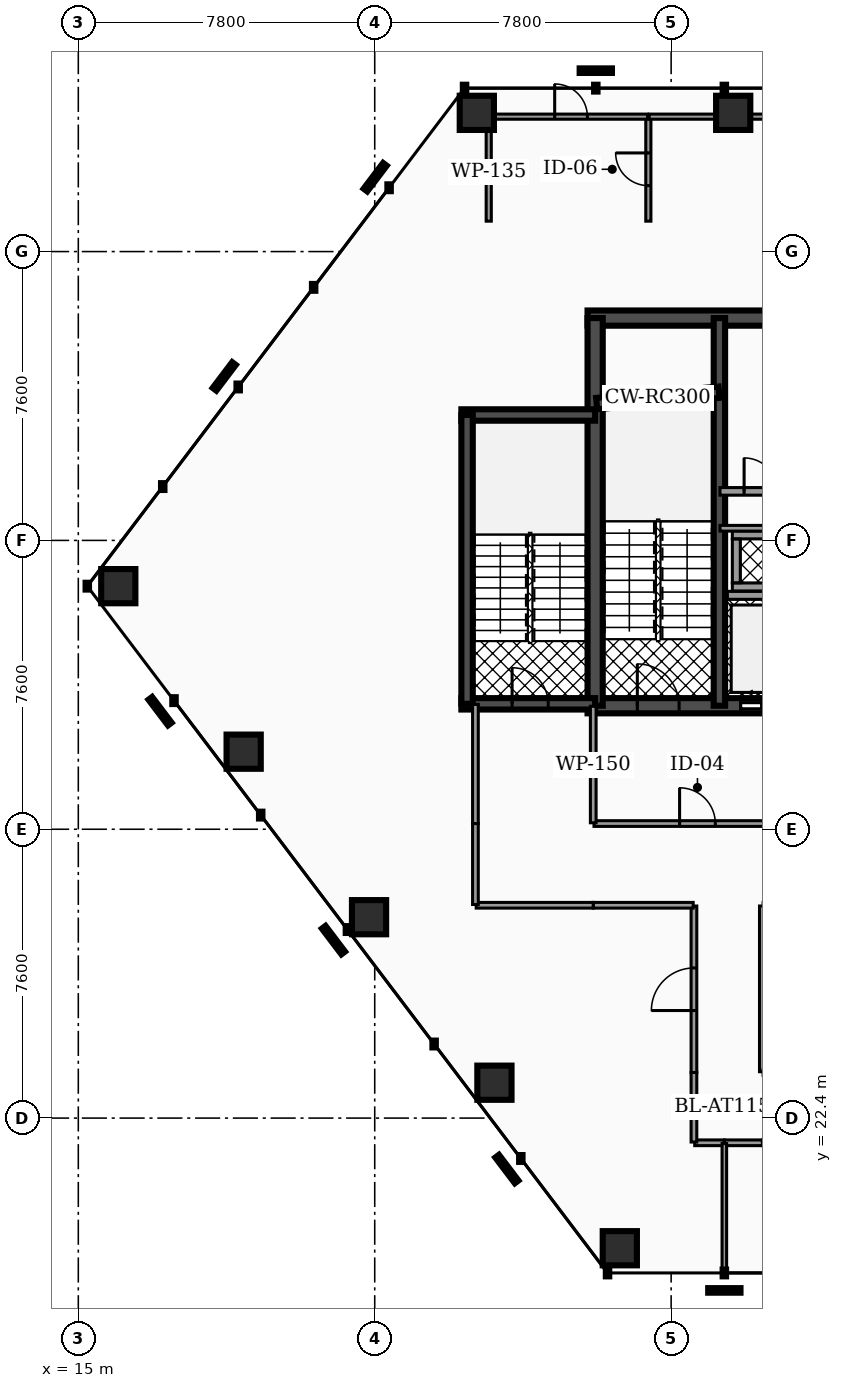
"""IFC4 building model, lengths in metres.
Left out: names, types, materials, properties, quantities, classifications, styles, units other than length and angle.
Written with IfcOpenShell. Run it as: python <this file> out.ifc"""

import sys

from ifc_helpers import new_model, si_unit, direction, frame, frame_2d, origin, origin_2d, place, context, subcontext, project, spatial, rectangle, hollow_rectangle, extrude, element, fill, save


model = new_model("IFC4")
c1 = context("Model", 3, precision=1e-05, world=origin(), true_north=direction((0.0, 1.0)))
c2 = subcontext(c1, "Body", "Model", "MODEL_VIEW")
j1 = project(units=[si_unit("LENGTHUNIT", "METRE"), si_unit("PLANEANGLEUNIT", "RADIAN")], contexts=[c1])
p1 = place(None, origin())
s1 = spatial("IfcSite", under=j1, at=p1, CompositionType="ELEMENT")
p2 = place(p1, origin())
s2 = spatial("IfcBuilding", under=s1, at=p2, CompositionType="ELEMENT")
p3 = place(p2, frame((0.0, 0.0, 105.06)))
s3 = spatial("IfcBuildingStorey", under=s2, at=p3, CompositionType="ELEMENT", Elevation=105.06)
p4 = place(p3, frame((28.4, 43.45, 0.0), z_axis=(0.0, 0.0, 1.0), x_axis=(1.0, 0.0, 0.0)))
e1 = element("IfcWall", 1, at=p4, inside=s3, PredefinedType="SHEAR", context=c2, shape_type="SweptSolid", body=[
    extrude(rectangle(XDim=20.06, YDim=0.4, at=frame_2d((10.03, 0.0))), origin(), (0.0, 0.0, 1.0), 3.73),
])
p5 = place(p3, frame((28.4, 33.25, 0.0), z_axis=(0.0, 0.0, 1.0), x_axis=(1.0, 0.0, 0.0)))
e2 = element("IfcWall", 2, at=p5, inside=s3, PredefinedType="SHEAR", context=c2, shape_type="SweptSolid", body=[
    extrude(rectangle(XDim=20.06, YDim=0.4, at=frame_2d((10.03, 0.0))), origin(), (0.0, 0.0, 1.0), 3.73),
])
p6 = place(p5, frame((4.03, 0.0, 0.0)))
e3 = element("IfcOpeningElement", 3, at=p6, cuts=e2, PredefinedType="OPENING", context=c2, shape_type="SweptSolid", body=[
    extrude(rectangle(XDim=1.1, YDim=2.15, at=frame_2d((0.55, 1.075))), frame((0.0, 0.21, 0.0), z_axis=(0.0, -1.0, 0.0), x_axis=(1.0, 0.0, 0.0)), (0.0, 0.0, 1.0), 0.42),
])
p7 = place(p5, frame((14.87, 0.0, 0.0)))
e4 = element("IfcOpeningElement", 4, at=p7, cuts=e2, PredefinedType="OPENING", context=c2, shape_type="SweptSolid", body=[
    extrude(rectangle(XDim=1.1, YDim=2.15, at=frame_2d((0.55, 1.075))), frame((0.0, 0.21, 0.0), z_axis=(0.0, -1.0, 0.0), x_axis=(1.0, 0.0, 0.0)), (0.0, 0.0, 1.0), 0.42),
])
p8 = place(p5, frame((1.31, 0.0, 0.0)))
e5 = element("IfcOpeningElement", 5, at=p8, cuts=e2, PredefinedType="OPENING", context=c2, shape_type="SweptSolid", body=[
    extrude(rectangle(XDim=1.1, YDim=2.2, at=frame_2d((0.55, 1.1))), frame((0.0, 0.21, 0.0), z_axis=(0.0, -1.0, 0.0), x_axis=(1.0, 0.0, 0.0)), (0.0, 0.0, 1.0), 0.42),
])
p9 = place(p5, frame((9.44, 0.0, 0.0)))
e6 = element("IfcOpeningElement", 6, at=p9, cuts=e2, PredefinedType="OPENING", context=c2, shape_type="SweptSolid", body=[
    extrude(rectangle(XDim=1.12, YDim=2.05, at=frame_2d((0.56, 1.025))), frame((0.0, 0.21, 0.0), z_axis=(0.0, -1.0, 0.0), x_axis=(1.0, 0.0, 0.0)), (0.0, 0.0, 1.0), 0.42),
])
p10 = place(p5, frame((17.65, 0.0, 0.0)))
e7 = element("IfcOpeningElement", 7, at=p10, cuts=e2, PredefinedType="OPENING", context=c2, shape_type="SweptSolid", body=[
    extrude(rectangle(XDim=1.1, YDim=2.2, at=frame_2d((0.55, 1.1))), frame((0.0, 0.21, 0.0), z_axis=(0.0, -1.0, 0.0), x_axis=(1.0, 0.0, 0.0)), (0.0, 0.0, 1.0), 0.42),
])
p11 = place(p3, frame((28.6, 33.25, 0.0), z_axis=(0.0, 0.0, 1.0), x_axis=(0.0, 1.0, 0.0)))
e8 = element("IfcWall", 8, at=p11, inside=s3, PredefinedType="SHEAR", context=c2, shape_type="SweptSolid", body=[
    extrude(rectangle(XDim=10.2, YDim=0.4, at=frame_2d((5.1, 0.0))), origin(), (0.0, 0.0, 1.0), 3.73),
])
p12 = place(p3, frame((31.87, 33.25, 0.0), z_axis=(0.0, 0.0, 1.0), x_axis=(0.0, 1.0, 0.0)))
e9 = element("IfcWall", 9, at=p12, inside=s3, PredefinedType="SHEAR", context=c2, shape_type="SweptSolid", body=[
    extrude(rectangle(XDim=10.2, YDim=0.3, at=frame_2d((5.1, 0.0))), origin(), (0.0, 0.0, 1.0), 3.73),
])
p13 = place(p3, frame((28.64, 41.2, 0.0), z_axis=(0.0, 0.0, 1.0), x_axis=(0.995687118776, 0.092774789157, 0.0)))
e10 = element("IfcWall", 10, at=p13, inside=s3, PredefinedType="SHEAR", context=c2, shape_type="SweptSolid", body=[
    extrude(rectangle(XDim=3.234, YDim=0.3, at=frame_2d((1.617, 0.0))), origin(), (0.0, 0.0, 1.0), 3.73),
])
p14 = place(p3, frame((25.08, 40.9, 0.0), z_axis=(0.0, 0.0, 1.0), x_axis=(1.0, 0.0, 0.0)))
e11 = element("IfcWall", 11, at=p14, inside=s3, PredefinedType="SHEAR", context=c2, shape_type="SweptSolid", body=[
    extrude(rectangle(XDim=3.52, YDim=0.3, at=frame_2d((1.76, 0.0))), origin(), (0.0, 0.0, 1.0), 3.73),
])
p15 = place(p3, frame((25.08, 33.3, 0.0), z_axis=(0.0, 0.0, 1.0), x_axis=(1.0, 0.0, 0.0)))
e12 = element("IfcWall", 12, at=p15, inside=s3, PredefinedType="SHEAR", context=c2, shape_type="SweptSolid", body=[
    extrude(rectangle(XDim=3.52, YDim=0.3, at=frame_2d((1.76, 0.0))), origin(), (0.0, 0.0, 1.0), 3.73),
])
p16 = place(p15, frame((1.335, 0.0, 0.0)))
e13 = element("IfcOpeningElement", 13, at=p16, cuts=e12, PredefinedType="OPENING", context=c2, shape_type="SweptSolid", body=[
    extrude(rectangle(XDim=0.95, YDim=2.2, at=frame_2d((0.475, 1.1))), frame((0.0, 0.16, 0.0), z_axis=(0.0, -1.0, 0.0), x_axis=(1.0, 0.0, 0.0)), (0.0, 0.0, 1.0), 0.32),
])
p17 = place(p3, frame((25.23, 33.3, 0.0), z_axis=(0.0, 0.0, 1.0), x_axis=(0.0, 1.0, 0.0)))
e14 = element("IfcWall", 14, at=p17, inside=s3, PredefinedType="SHEAR", context=c2, shape_type="SweptSolid", body=[
    extrude(rectangle(XDim=7.6, YDim=0.3, at=frame_2d((3.8, 0.0))), origin(), (0.0, 0.0, 1.0), 3.73),
])
p18 = place(p3, frame((32.233, 48.85, 0.0), z_axis=(-0.073076267852, -0.031187907173, 0.996838589503), x_axis=(0.392531312989, -0.919738641312, 0.0)))
e15 = element("IfcColumn", 15, at=p18, inside=s3, PredefinedType="COLUMN", context=c2, shape_type="SweptSolid", body=[
    extrude(hollow_rectangle(XDim=0.9, YDim=0.9, WallThickness=0.045, at=origin_2d()), origin(), (0.0, 0.0, 1.0), 3.742),
])
p19 = place(p3, frame((25.487, 48.85, 0.0), z_axis=(-0.140111029019, -0.030963047559, 0.989651549402), x_axis=(0.215783146828, -0.976441310855, 0.0)))
e16 = element("IfcColumn", 16, at=p19, inside=s3, PredefinedType="COLUMN", context=c2, shape_type="SweptSolid", body=[
    extrude(hollow_rectangle(XDim=0.9, YDim=0.9, WallThickness=0.045, at=origin_2d()), origin(), (0.0, 0.0, 1.0), 3.769),
])
p20 = place(p3, frame((16.052, 36.396, 0.0), z_axis=(-0.028003599428, 0.117602122889, 0.99266587486), x_axis=(-0.972800447658, -0.231644747481, 0.0)))
e17 = element("IfcColumn", 17, at=p20, inside=s3, PredefinedType="COLUMN", context=c2, shape_type="SweptSolid", body=[
    extrude(hollow_rectangle(XDim=0.9, YDim=0.9, WallThickness=0.045, at=origin_2d()), origin(), (0.0, 0.0, 1.0), 3.758),
])
p21 = place(p3, frame((19.351, 32.041, 0.0), z_axis=(0.000978682971, 0.07966479387, 0.996821229106), x_axis=(-0.999924547777, 0.012284085354, 0.0)))
e18 = element("IfcColumn", 18, at=p21, inside=s3, PredefinedType="COLUMN", context=c2, shape_type="SweptSolid", body=[
    extrude(hollow_rectangle(XDim=0.9, YDim=0.9, WallThickness=0.045, at=origin_2d()), origin(), (0.0, 0.0, 1.0), 3.742),
])
p22 = place(p3, frame((22.65, 27.686, 0.0), z_axis=(0.030199857553, 0.041377726906, 0.99868706426), x_axis=(-0.807741678923, 0.589536580825, 0.0)))
e19 = element("IfcColumn", 19, at=p22, inside=s3, PredefinedType="COLUMN", context=c2, shape_type="SweptSolid", body=[
    extrude(hollow_rectangle(XDim=0.9, YDim=0.9, WallThickness=0.045, at=origin_2d()), origin(), (0.0, 0.0, 1.0), 3.735),
])
p23 = place(p3, frame((25.95, 23.331, 0.0), z_axis=(0.059326933862, 0.002874873447, 0.998234466456), x_axis=(-0.048401355257, 0.998827967575, 0.0)))
e20 = element("IfcColumn", 20, at=p23, inside=s3, PredefinedType="COLUMN", context=c2, shape_type="SweptSolid", body=[
    extrude(hollow_rectangle(XDim=0.9, YDim=0.9, WallThickness=0.045, at=origin_2d()), origin(), (0.0, 0.0, 1.0), 3.737),
])
p24 = place(p3, frame((29.249, 18.976, 0.0), z_axis=(0.088158041062, -0.035445657308, 0.995475647705), x_axis=(0.37304533296, 0.927813116719, 0.0)))
e21 = element("IfcColumn", 21, at=p24, inside=s3, PredefinedType="COLUMN", context=c2, shape_type="SweptSolid", body=[
    extrude(hollow_rectangle(XDim=0.9, YDim=0.9, WallThickness=0.045, at=origin_2d()), origin(), (0.0, 0.0, 1.0), 3.747),
])
p25 = place(p3, frame((32.08, 36.155, 0.0), z_axis=(0.0, 0.0, 1.0), x_axis=(1.0, 0.0, 0.0)))
e22 = element("IfcWall", 22, at=p25, inside=s3, PredefinedType="SOLIDWALL", context=c2, shape_type="SweptSolid", body=[
    extrude(rectangle(XDim=1.8, YDim=0.21, at=frame_2d((0.9, 0.0))), origin(), (0.0, 0.0, 1.0), 2.702),
])
for number, where, z_axis, x_axis in (
    (23, (32.21, 36.375, 0.0), (0.0, 0.0, 1.0), (1.0, 0.0, 0.0)),
    (24, (32.21, 37.745, 0.0), (0.0, 0.0, 1.0), (1.0, 0.0, 0.0)),
):
    element("IfcWall", number, at=place(p3, frame(where, z_axis=z_axis, x_axis=x_axis)), inside=s3, PredefinedType="SOLIDWALL", context=c2, shape_type="SweptSolid", body=[
        extrude(rectangle(XDim=1.6, YDim=0.21, at=frame_2d((0.8, 0.0))), origin(), (0.0, 0.0, 1.0), 3.73),
    ])
p26 = place(p3, frame((32.315, 36.485, 0.0), z_axis=(0.0, 0.0, 1.0), x_axis=(0.0, 1.0, 0.0)))
e25 = element("IfcWall", 25, at=p26, inside=s3, PredefinedType="SOLIDWALL", context=c2, shape_type="SweptSolid", body=[
    extrude(rectangle(XDim=1.15, YDim=0.21, at=frame_2d((0.575, 0.0))), origin(), (0.0, 0.0, 1.0), 3.73),
])
p27 = place(p3, frame((31.885, 37.92, 0.0), z_axis=(0.0, 0.0, 1.0), x_axis=(1.0, 0.0, 0.0)))
e26 = element("IfcWall", 26, at=p27, inside=s3, PredefinedType="PARTITIONING", context=c2, shape_type="SweptSolid", body=[
    extrude(rectangle(XDim=3.295, YDim=0.15, at=frame_2d((1.647, 0.0))), origin(), (0.0, 0.0, 1.0), 2.687),
])
p28 = place(p3, frame((31.885, 38.89, 0.0), z_axis=(0.0, 0.0, 1.0), x_axis=(1.0, 0.0, 0.0)))
e27 = element("IfcWall", 27, at=p28, inside=s3, PredefinedType="PARTITIONING", context=c2, shape_type="SweptSolid", body=[
    extrude(rectangle(XDim=2.15, YDim=0.2, at=frame_2d((1.075, 0.0))), origin(), (0.0, 0.0, 1.0), 2.687),
])
p29 = place(p28, frame((0.635, 0.0, 0.0)))
e28 = element("IfcOpeningElement", 28, at=p29, cuts=e27, PredefinedType="OPENING", context=c2, shape_type="SweptSolid", body=[
    extrude(rectangle(XDim=0.88, YDim=2.05, at=frame_2d((0.44, 1.025))), frame((0.0, 0.11, 0.0), z_axis=(0.0, -1.0, 0.0), x_axis=(1.0, 0.0, 0.0)), (0.0, 0.0, 1.0), 0.22),
])
p30 = place(p3, frame((28.57, 30.15, 0.0), z_axis=(0.0, 0.0, 1.0), x_axis=(1.0, 0.0, 0.0)))
e29 = element("IfcWall", 29, at=p30, inside=s3, PredefinedType="PARTITIONING", context=c2, shape_type="SweptSolid", body=[
    extrude(rectangle(XDim=5.445, YDim=0.15, at=frame_2d((2.722, 0.0))), origin(), (0.0, 0.0, 1.0), 2.687),
])
p31 = place(p30, frame((2.252, 0.0, 0.0)))
e30 = element("IfcOpeningElement", 30, at=p31, cuts=e29, PredefinedType="OPENING", context=c2, shape_type="SweptSolid", body=[
    extrude(rectangle(XDim=0.94, YDim=2.05, at=frame_2d((0.47, 1.025))), frame((0.0, 0.085, 0.0), z_axis=(0.0, -1.0, 0.0), x_axis=(1.0, 0.0, 0.0)), (0.0, 0.0, 1.0), 0.17),
])
p32 = place(p3, frame((28.55, 30.17, 0.0), z_axis=(0.0, 0.0, 1.0), x_axis=(0.0, 1.0, 0.0)))
e31 = element("IfcWall", 31, at=p32, inside=s3, PredefinedType="PARTITIONING", context=c2, shape_type="SweptSolid", body=[
    extrude(rectangle(XDim=3.065, YDim=0.15, at=frame_2d((1.533, 0.0))), origin(), (0.0, 0.0, 1.0), 2.687),
])
p33 = place(p3, frame((33.0, 21.75, 0.0), z_axis=(0.0, 0.0, 1.0), x_axis=(1.0, 0.0, 0.0)))
e32 = element("IfcWall", 32, at=p33, inside=s3, PredefinedType="PARTITIONING", context=c2, shape_type="SweptSolid", body=[
    extrude(rectangle(XDim=10.8, YDim=0.15, at=frame_2d((5.4, 0.0))), origin(), (0.0, 0.0, 1.0), 2.687),
])
p34 = place(p33, frame((4.93, 0.0, 0.0)))
e33 = element("IfcOpeningElement", 33, at=p34, cuts=e32, PredefinedType="OPENING", context=c2, shape_type="SweptSolid", body=[
    extrude(rectangle(XDim=0.94, YDim=2.05, at=frame_2d((0.47, 1.025))), frame((0.0, 0.085, 0.0), z_axis=(0.0, -1.0, 0.0), x_axis=(1.0, 0.0, 0.0)), (0.0, 0.0, 1.0), 0.17),
])
p35 = place(p3, frame((32.005, 21.75, 0.0), z_axis=(0.0, 0.0, 1.0), x_axis=(1.0, 0.0, 0.0)))
e34 = element("IfcWall", 34, at=p35, inside=s3, PredefinedType="PARTITIONING", context=c2, shape_type="SweptSolid", body=[
    extrude(rectangle(XDim=0.995, YDim=0.15, at=frame_2d((0.498, 0.0))), origin(), (0.0, 0.0, 1.0), 2.687),
])
p36 = place(p3, frame((31.22, 21.75, 0.0), z_axis=(0.0, 0.0, 1.0), x_axis=(1.0, 0.0, 0.0)))
e35 = element("IfcWall", 35, at=p36, inside=s3, PredefinedType="PARTITIONING", context=c2, shape_type="SweptSolid", body=[
    extrude(rectangle(XDim=0.775, YDim=0.15, at=frame_2d((0.388, 0.0))), origin(), (0.0, 0.0, 1.0), 2.687),
])
p37 = place(p3, frame((31.2, 21.77, 0.0), z_axis=(0.0, 0.0, 1.0), x_axis=(0.0, 1.0, 0.0)))
e36 = element("IfcWall", 36, at=p37, inside=s3, PredefinedType="PARTITIONING", context=c2, shape_type="SweptSolid", body=[
    extrude(rectangle(XDim=1.83, YDim=0.15, at=frame_2d((0.915, 0.0))), origin(), (0.0, 0.0, 1.0), 2.687),
])
p38 = place(p3, frame((31.2, 23.6, 0.0), z_axis=(0.0, 0.0, 1.0), x_axis=(0.0, 1.0, 0.0)))
e37 = element("IfcWall", 37, at=p38, inside=s3, PredefinedType="PARTITIONING", context=c2, shape_type="SweptSolid", body=[
    extrude(rectangle(XDim=4.38, YDim=0.15, at=frame_2d((2.19, 0.0))), origin(), (0.0, 0.0, 1.0), 2.687),
])
p39 = place(p38, frame((1.63, 0.0, 0.0)))
e38 = element("IfcOpeningElement", 38, at=p39, cuts=e37, PredefinedType="OPENING", context=c2, shape_type="SweptSolid", body=[
    extrude(rectangle(XDim=1.12, YDim=2.05, at=frame_2d((0.56, 1.025))), frame((0.0, 0.085, 0.0), z_axis=(0.0, -1.0, 0.0), x_axis=(1.0, 0.0, 0.0)), (0.0, 0.0, 1.0), 0.17),
])
p40 = place(p3, frame((28.55, 28.0, 0.0), z_axis=(0.0, 0.0, 1.0), x_axis=(1.0, 0.0, 0.0)))
e39 = element("IfcWall", 39, at=p40, inside=s3, PredefinedType="PARTITIONING", context=c2, shape_type="SweptSolid", body=[
    extrude(rectangle(XDim=2.63, YDim=0.15, at=frame_2d((1.315, 0.0))), origin(), (0.0, 0.0, 1.0), 2.687),
])
p41 = place(p3, frame((25.47, 28.0, 0.0), z_axis=(0.0, 0.0, 1.0), x_axis=(1.0, 0.0, 0.0)))
e40 = element("IfcWall", 40, at=p41, inside=s3, PredefinedType="PARTITIONING", context=c2, shape_type="SweptSolid", body=[
    extrude(rectangle(XDim=3.08, YDim=0.15, at=frame_2d((1.54, 0.0))), origin(), (0.0, 0.0, 1.0), 2.687),
])
p42 = place(p3, frame((25.45, 28.02, 0.0), z_axis=(0.0, 0.0, 1.0), x_axis=(0.0, 1.0, 0.0)))
e41 = element("IfcWall", 41, at=p42, inside=s3, PredefinedType="PARTITIONING", context=c2, shape_type="SweptSolid", body=[
    extrude(rectangle(XDim=2.13, YDim=0.15, at=frame_2d((1.065, 0.0))), origin(), (0.0, 0.0, 1.0), 2.687),
])
p43 = place(p3, frame((25.45, 30.15, 0.0), z_axis=(0.0, 0.0, 1.0), x_axis=(0.0, 1.0, 0.0)))
e42 = element("IfcWall", 42, at=p43, inside=s3, PredefinedType="PARTITIONING", context=c2, shape_type="SweptSolid", body=[
    extrude(rectangle(XDim=3.135, YDim=0.15, at=frame_2d((1.567, 0.0))), origin(), (0.0, 0.0, 1.0), 2.687),
])
p44 = place(p3, frame((33.0, 23.62, 0.0), z_axis=(0.0, 0.0, 1.0), x_axis=(0.0, 1.0, 0.0)))
e43 = element("IfcWall", 43, at=p44, inside=s3, PredefinedType="PARTITIONING", context=c2, shape_type="SweptSolid", body=[
    extrude(rectangle(XDim=4.36, YDim=0.15, at=frame_2d((2.18, 0.0))), origin(), (0.0, 0.0, 1.0), 2.687),
])
p45 = place(p3, frame((30.0, 46.0, 0.0), z_axis=(0.0, 0.0, 1.0), x_axis=(0.0, 1.0, 0.0)))
e44 = element("IfcWall", 44, at=p45, inside=s3, PredefinedType="PARTITIONING", context=c2, shape_type="SweptSolid", body=[
    extrude(rectangle(XDim=2.73, YDim=0.135, at=frame_2d((1.365, 0.0))), origin(), (0.0, 0.0, 1.0), 2.687),
])
p46 = place(p45, frame((0.935, 0.0, 0.0)))
e45 = element("IfcOpeningElement", 45, at=p46, cuts=e44, PredefinedType="OPENING", context=c2, shape_type="SweptSolid", body=[
    extrude(rectangle(XDim=0.86, YDim=2.05, at=frame_2d((0.43, 1.025))), frame((0.0, 0.077, 0.0), z_axis=(0.0, -1.0, 0.0), x_axis=(1.0, 0.0, 0.0)), (0.0, 0.0, 1.0), 0.155),
])
p47 = place(p3, frame((25.951, 48.75, 0.0), z_axis=(0.0, 0.0, 1.0), x_axis=(1.0, 0.0, 0.0)))
e46 = element("IfcWall", 46, at=p47, inside=s3, PredefinedType="PARTITIONING", context=c2, shape_type="SweptSolid", body=[
    extrude(rectangle(XDim=4.029, YDim=0.135, at=frame_2d((2.015, 0.0))), origin(), (0.0, 0.0, 1.0), 2.687),
])
p48 = place(p47, frame((1.584, 0.0, 0.0)))
e47 = element("IfcOpeningElement", 47, at=p48, cuts=e46, PredefinedType="OPENING", context=c2, shape_type="SweptSolid", body=[
    extrude(rectangle(XDim=0.86, YDim=2.05, at=frame_2d((0.43, 1.025))), frame((0.0, 0.077, 0.0), z_axis=(0.0, -1.0, 0.0), x_axis=(1.0, 0.0, 0.0)), (0.0, 0.0, 1.0), 0.155),
])
p49 = place(p3, frame((25.8, 46.0, 0.0), z_axis=(0.0, 0.0, 1.0), x_axis=(0.0, 1.0, 0.0)))
e48 = element("IfcWall", 48, at=p49, inside=s3, PredefinedType="PARTITIONING", context=c2, shape_type="SweptSolid", body=[
    extrude(rectangle(XDim=2.599, YDim=0.135, at=frame_2d((1.3, 0.0))), origin(), (0.0, 0.0, 1.0), 2.687),
])
p50 = place(p3, frame((30.02, 48.75, 0.0), z_axis=(0.0, 0.0, 1.0), x_axis=(1.0, 0.0, 0.0)))
e49 = element("IfcWall", 49, at=p50, inside=s3, PredefinedType="PARTITIONING", context=c2, shape_type="SweptSolid", body=[
    extrude(rectangle(XDim=1.755, YDim=0.135, at=frame_2d((0.877, 0.0))), origin(), (0.0, 0.0, 1.0), 2.687),
])
p51 = place(p3, frame((32.198, 48.75, 0.0), z_axis=(0.0, 0.0, 1.0), x_axis=(1.0, 0.0, 0.0)))
e50 = element("IfcWall", 50, at=p51, inside=s3, PredefinedType="PARTITIONING", context=c2, shape_type="SweptSolid", body=[
    extrude(rectangle(XDim=1.982, YDim=0.135, at=frame_2d((0.991, 0.0))), origin(), (0.0, 0.0, 1.0), 2.687),
])
p52 = place(p3, frame((32.0, 18.341, 0.0), z_axis=(0.0, 0.0, 1.0), x_axis=(0.0, 1.0, 0.0)))
e51 = element("IfcWall", 51, at=p52, inside=s3, PredefinedType="PARTITIONING", context=c2, shape_type="SweptSolid", body=[
    extrude(rectangle(XDim=3.389, YDim=0.12, at=frame_2d((1.695, 0.0))), origin(), (0.0, 0.0, 1.0), 2.687),
])
p53 = place(p3, frame((32.0, 48.977, 0.0), z_axis=(0.0, 0.0, 1.0), x_axis=(0.0, 1.0, 0.0)))
e52 = element("IfcWall", 52, at=p53, inside=s3, PredefinedType="PARTITIONING", context=c2, shape_type="SweptSolid", body=[
    extrude(rectangle(XDim=0.509, YDim=0.12, at=frame_2d((0.254, 0.0))), origin(), (0.0, 0.0, 1.0), 2.687),
])
p54 = place(p6, origin())
e53 = element("IfcDoor", 53, at=p54, inside=s3, OperationType="SLIDING_TO_LEFT", PredefinedType="DOOR", context=c2, shape_type="SweptSolid", body=[
    extrude(rectangle(XDim=1.1, YDim=2.15, at=frame_2d((0.55, 1.075))), frame((0.0, 0.025, 0.0), z_axis=(0.0, -1.0, 0.0), x_axis=(1.0, 0.0, 0.0)), (0.0, 0.0, 1.0), 0.05),
])
fill(e3, e53)
p55 = place(p8, origin())
e54 = element("IfcDoor", 54, at=p55, inside=s3, OperationType="SINGLE_SWING_LEFT", PredefinedType="DOOR", context=c2, shape_type="SweptSolid", body=[
    extrude(rectangle(XDim=1.1, YDim=2.2, at=frame_2d((0.55, 1.1))), frame((0.0, 0.025, 0.0), z_axis=(0.0, -1.0, 0.0), x_axis=(1.0, 0.0, 0.0)), (0.0, 0.0, 1.0), 0.05),
])
fill(e5, e54)
p56 = place(p16, origin())
e55 = element("IfcDoor", 55, at=p56, inside=s3, OperationType="SINGLE_SWING_LEFT", PredefinedType="DOOR", context=c2, shape_type="SweptSolid", body=[
    extrude(rectangle(XDim=0.95, YDim=2.2, at=frame_2d((0.475, 1.1))), frame((0.0, 0.025, 0.0), z_axis=(0.0, -1.0, 0.0), x_axis=(1.0, 0.0, 0.0)), (0.0, 0.0, 1.0), 0.05),
])
fill(e13, e55)
p57 = place(p29, origin())
e56 = element("IfcDoor", 56, at=p57, inside=s3, OperationType="SINGLE_SWING_LEFT", PredefinedType="DOOR", context=c2, shape_type="SweptSolid", body=[
    extrude(rectangle(XDim=0.88, YDim=2.05, at=frame_2d((0.44, 1.025))), frame((0.0, 0.025, 0.0), z_axis=(0.0, -1.0, 0.0), x_axis=(1.0, 0.0, 0.0)), (0.0, 0.0, 1.0), 0.05),
])
fill(e28, e56)
p58 = place(p31, origin())
e57 = element("IfcDoor", 57, at=p58, inside=s3, OperationType="SINGLE_SWING_LEFT", PredefinedType="DOOR", context=c2, shape_type="SweptSolid", body=[
    extrude(rectangle(XDim=0.94, YDim=2.05, at=frame_2d((0.47, 1.025))), frame((0.0, 0.025, 0.0), z_axis=(0.0, -1.0, 0.0), x_axis=(1.0, 0.0, 0.0)), (0.0, 0.0, 1.0), 0.05),
])
fill(e30, e57)
p59 = place(p39, origin())
e58 = element("IfcDoor", 58, at=p59, inside=s3, OperationType="SINGLE_SWING_LEFT", PredefinedType="DOOR", context=c2, shape_type="SweptSolid", body=[
    extrude(rectangle(XDim=1.12, YDim=2.05, at=frame_2d((0.56, 1.025))), frame((0.0, 0.025, 0.0), z_axis=(0.0, -1.0, 0.0), x_axis=(1.0, 0.0, 0.0)), (0.0, 0.0, 1.0), 0.05),
])
fill(e38, e58)
p60 = place(p46, origin())
e59 = element("IfcDoor", 59, at=p60, inside=s3, OperationType="SINGLE_SWING_RIGHT", PredefinedType="DOOR", context=c2, shape_type="SweptSolid", body=[
    extrude(rectangle(XDim=0.86, YDim=2.05, at=frame_2d((0.43, 1.025))), frame((0.0, 0.025, 0.0), z_axis=(0.0, -1.0, 0.0), x_axis=(1.0, 0.0, 0.0)), (0.0, 0.0, 1.0), 0.05),
])
fill(e45, e59)
p61 = place(p48, origin())
e60 = element("IfcDoor", 60, at=p61, inside=s3, OperationType="SINGLE_SWING_LEFT", PredefinedType="DOOR", context=c2, shape_type="SweptSolid", body=[
    extrude(rectangle(XDim=0.86, YDim=2.05, at=frame_2d((0.43, 1.025))), frame((0.0, 0.025, 0.0), z_axis=(0.0, -1.0, 0.0), x_axis=(1.0, 0.0, 0.0)), (0.0, 0.0, 1.0), 0.05),
])
fill(e47, e60)
save(model, sys.argv[1])
